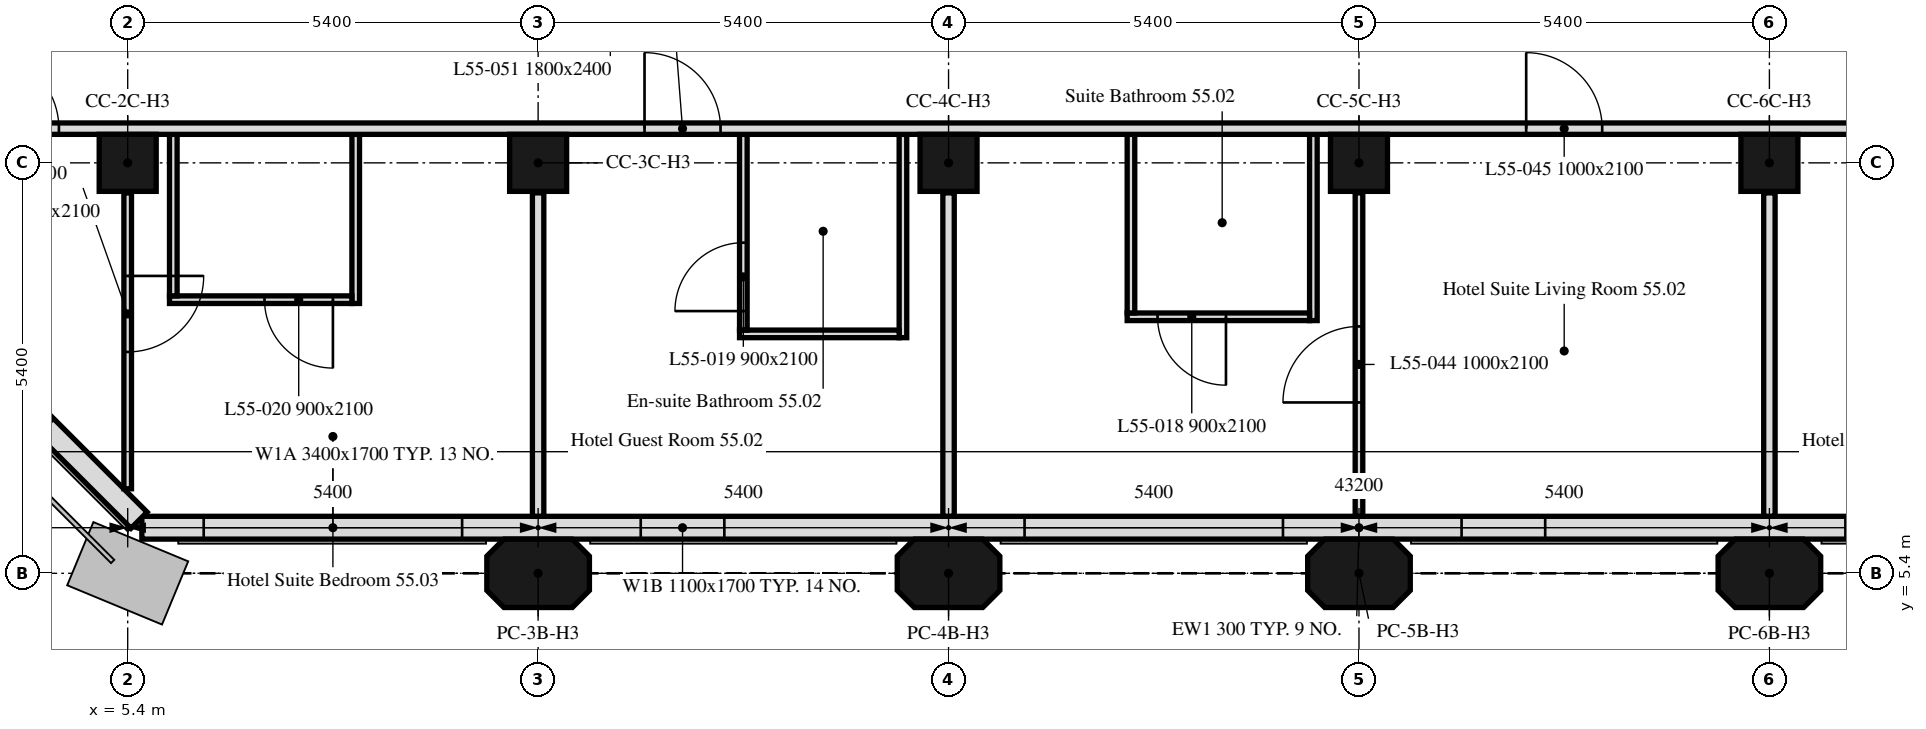
"""IFC4 building model, lengths in metres.
Left out: names, types, materials, properties, quantities, classifications, styles, units other than length and angle.
Written with IfcOpenShell. Run it as: python <this file> out.ifc"""

import sys

from ifc_helpers import new_model, si_unit, direction, frame, frame_2d, origin, origin_2d, place, context, subcontext, project, spatial, polyline, rectangle, outline, extrude, element, fill, save


model = new_model("IFC4")
c1 = context("Model", 3, precision=1e-05, world=origin(), true_north=direction((0.0, 1.0)))
c2 = subcontext(c1, "Body", "Model", "MODEL_VIEW")
j1 = project(units=[si_unit("LENGTHUNIT", "METRE"), si_unit("PLANEANGLEUNIT", "RADIAN")], contexts=[c1])
p1 = place(None, origin())
s1 = spatial("IfcSite", under=j1, at=p1, CompositionType="ELEMENT")
p2 = place(p1, origin())
s2 = spatial("IfcBuilding", under=s1, at=p2, CompositionType="ELEMENT")
p3 = place(p2, frame((0.0, 0.0, 220.3)))
s3 = spatial("IfcBuildingStorey", under=s2, at=p3, CompositionType="ELEMENT", Elevation=220.3)
for number, where, z_axis, x_axis in (
    (1, (10.8, 5.4, 0.0), (0.0, 0.0, 1.0), (1.0, 0.0, 0.0)),
    (2, (16.2, 5.4, 0.0), (0.0, 0.0, 1.0), (1.0, 0.0, 0.0)),
    (3, (21.6, 5.4, 0.0), (0.0, 0.0, 1.0), (1.0, 0.0, 0.0)),
    (4, (27.0, 5.4, 0.0), (0.0, 0.0, 1.0), (1.0, 0.0, 0.0)),
):
    element("IfcColumn", number, at=place(p3, frame(where, z_axis=z_axis, x_axis=x_axis)), inside=s3, PredefinedType="COLUMN", context=c2, shape_type="SweptSolid", body=[
        extrude(outline(polyline([(-0.45, -0.45), (0.45, -0.45), (0.675, -0.225), (0.675, 0.225), (0.45, 0.45), (-0.45, 0.45), (-0.675, 0.225), (-0.675, -0.225), (-0.45, -0.45)])), origin(), (0.0, 0.0, 1.0), 3.0),
    ])
for number, where, z_axis, x_axis in (
    (5, (5.4, 10.8, 0.0), (0.0, 0.0, 1.0), (1.0, 0.0, 0.0)),
    (6, (10.8, 10.8, 0.0), (0.0, 0.0, 1.0), (1.0, 0.0, 0.0)),
    (7, (16.2, 10.8, 0.0), (0.0, 0.0, 1.0), (1.0, 0.0, 0.0)),
    (8, (21.6, 10.8, 0.0), (0.0, 0.0, 1.0), (1.0, 0.0, 0.0)),
    (9, (27.0, 10.8, 0.0), (0.0, 0.0, 1.0), (1.0, 0.0, 0.0)),
):
    element("IfcColumn", number, at=place(p3, frame(where, z_axis=z_axis, x_axis=x_axis)), inside=s3, PredefinedType="COLUMN", context=c2, shape_type="SweptSolid", body=[
        extrude(rectangle(XDim=0.75, YDim=0.75, at=origin_2d()), origin(), (0.0, 0.0, 1.0), 3.0),
    ])
p4 = place(p3, frame((5.586, 6.0, 0.0), z_axis=(0.0, 0.0, 1.0), x_axis=(1.0, 0.0, 0.0)))
e10 = element("IfcWall", 10, at=p4, inside=s3, PredefinedType="SOLIDWALL", context=c2, shape_type="SweptSolid", body=[
    extrude(rectangle(XDim=32.027, YDim=0.3, at=frame_2d((16.014, 0.0))), origin(), (0.0, 0.0, 1.0), 3.0),
])
p5 = place(p4, frame((0.814, 0.0, 0.9)))
e11 = element("IfcOpeningElement", 11, at=p5, cuts=e10, PredefinedType="OPENING", context=c2, shape_type="SweptSolid", body=[
    extrude(rectangle(XDim=3.4, YDim=1.7, at=frame_2d((1.7, 0.85))), frame((0.0, 0.16, 0.0), z_axis=(0.0, -1.0, 0.0), x_axis=(1.0, 0.0, 0.0)), (0.0, 0.0, 1.0), 0.32),
])
p6 = place(p4, frame((6.564, 0.0, 0.9)))
e12 = element("IfcOpeningElement", 12, at=p6, cuts=e10, PredefinedType="OPENING", context=c2, shape_type="SweptSolid", body=[
    extrude(rectangle(XDim=1.1, YDim=1.7, at=frame_2d((0.55, 0.85))), frame((0.0, 0.16, 0.0), z_axis=(0.0, -1.0, 0.0), x_axis=(1.0, 0.0, 0.0)), (0.0, 0.0, 1.0), 0.32),
])
p7 = place(p4, frame((11.614, 0.0, 0.9)))
e13 = element("IfcOpeningElement", 13, at=p7, cuts=e10, PredefinedType="OPENING", context=c2, shape_type="SweptSolid", body=[
    extrude(rectangle(XDim=3.4, YDim=1.7, at=frame_2d((1.7, 0.85))), frame((0.0, 0.16, 0.0), z_axis=(0.0, -1.0, 0.0), x_axis=(1.0, 0.0, 0.0)), (0.0, 0.0, 1.0), 0.32),
])
p8 = place(p4, frame((17.364, 0.0, 0.9)))
e14 = element("IfcOpeningElement", 14, at=p8, cuts=e10, PredefinedType="OPENING", context=c2, shape_type="SweptSolid", body=[
    extrude(rectangle(XDim=1.1, YDim=1.7, at=frame_2d((0.55, 0.85))), frame((0.0, 0.16, 0.0), z_axis=(0.0, -1.0, 0.0), x_axis=(1.0, 0.0, 0.0)), (0.0, 0.0, 1.0), 0.32),
])
p9 = place(p4, frame((22.414, 0.0, 0.9)))
e15 = element("IfcOpeningElement", 15, at=p9, cuts=e10, PredefinedType="OPENING", context=c2, shape_type="SweptSolid", body=[
    extrude(rectangle(XDim=3.4, YDim=1.7, at=frame_2d((1.7, 0.85))), frame((0.0, 0.16, 0.0), z_axis=(0.0, -1.0, 0.0), x_axis=(1.0, 0.0, 0.0)), (0.0, 0.0, 1.0), 0.32),
])
p10 = place(p4, frame((28.164, 0.0, 0.9)))
e16 = element("IfcOpeningElement", 16, at=p10, cuts=e10, PredefinedType="OPENING", context=c2, shape_type="SweptSolid", body=[
    extrude(rectangle(XDim=1.1, YDim=1.7, at=frame_2d((0.55, 0.85))), frame((0.0, 0.16, 0.0), z_axis=(0.0, -1.0, 0.0), x_axis=(1.0, 0.0, 0.0)), (0.0, 0.0, 1.0), 0.32),
])
p11 = place(p3, frame((0.699, 10.949, 0.0), z_axis=(0.0, 0.0, 1.0), x_axis=(0.707106781187, -0.707106781187, 0.0)))
e17 = element("IfcWall", 17, at=p11, inside=s3, PredefinedType="SOLIDWALL", context=c2, shape_type="SweptSolid", body=[
    extrude(rectangle(XDim=6.86, YDim=0.3, at=frame_2d((3.43, 0.0))), origin(), (0.0, 0.0, 1.0), 3.0),
])
p12 = place(p11, frame((1.73, 0.0, 0.9)))
e18 = element("IfcOpeningElement", 18, at=p12, cuts=e17, PredefinedType="OPENING", context=c2, shape_type="SweptSolid", body=[
    extrude(rectangle(XDim=3.4, YDim=1.7, at=frame_2d((1.7, 0.85))), frame((0.0, 0.16, 0.0), z_axis=(0.0, -1.0, 0.0), x_axis=(1.0, 0.0, 0.0)), (0.0, 0.0, 1.0), 0.32),
])
p13 = place(p3, frame((27.0, 10.405, 0.0), z_axis=(0.0, 0.0, 1.0), x_axis=(0.0, -1.0, 0.0)))
e19 = element("IfcWall", 19, at=p13, inside=s3, PredefinedType="PARTITIONING", context=c2, shape_type="SweptSolid", body=[
    extrude(rectangle(XDim=4.254, YDim=0.15, at=frame_2d((2.127, 0.0))), origin(), (0.0, 0.0, 1.0), 3.0),
])
p14 = place(p3, frame((21.6, 6.151, 0.0), z_axis=(0.0, 0.0, 1.0), x_axis=(0.0, 1.0, 0.0)))
e20 = element("IfcWall", 20, at=p14, inside=s3, PredefinedType="PARTITIONING", context=c2, shape_type="SweptSolid", body=[
    extrude(rectangle(XDim=4.254, YDim=0.1, at=frame_2d((2.127, 0.0))), origin(), (0.0, 0.0, 1.0), 3.0),
])
p15 = place(p14, frame((1.497, 0.0, 0.0)))
e21 = element("IfcOpeningElement", 21, at=p15, cuts=e20, PredefinedType="OPENING", context=c2, shape_type="SweptSolid", body=[
    extrude(rectangle(XDim=1.0, YDim=2.1, at=frame_2d((0.5, 1.05))), frame((0.0, 0.05, 0.0), z_axis=(0.0, -1.0, 0.0), x_axis=(1.0, 0.0, 0.0)), (0.0, 0.0, 1.0), 0.1),
])
p16 = place(p3, frame((21.0, 11.175, 0.0), z_axis=(0.0, 0.0, 1.0), x_axis=(0.0, -1.0, 0.0)))
e22 = element("IfcWall", 22, at=p16, inside=s3, PredefinedType="PARTITIONING", context=c2, shape_type="SweptSolid", body=[
    extrude(rectangle(XDim=2.45, YDim=0.1, at=frame_2d((1.225, 0.0))), origin(), (0.0, 0.0, 1.0), 3.0),
])
p17 = place(p3, frame((20.95, 8.775, 0.0), z_axis=(0.0, 0.0, 1.0), x_axis=(-1.0, 0.0, 0.0)))
e23 = element("IfcWall", 23, at=p17, inside=s3, PredefinedType="PARTITIONING", context=c2, shape_type="SweptSolid", body=[
    extrude(rectangle(XDim=2.4, YDim=0.1, at=frame_2d((1.2, 0.0))), origin(), (0.0, 0.0, 1.0), 3.0),
])
p18 = place(p17, frame((1.1, 0.0, 0.0)))
e24 = element("IfcOpeningElement", 24, at=p18, cuts=e23, PredefinedType="OPENING", context=c2, shape_type="SweptSolid", body=[
    extrude(rectangle(XDim=0.9, YDim=2.1, at=frame_2d((0.45, 1.05))), frame((0.0, 0.05, 0.0), z_axis=(0.0, -1.0, 0.0), x_axis=(1.0, 0.0, 0.0)), (0.0, 0.0, 1.0), 0.1),
])
p19 = place(p3, frame((18.6, 8.825, 0.0), z_axis=(0.0, 0.0, 1.0), x_axis=(0.0, 1.0, 0.0)))
e25 = element("IfcWall", 25, at=p19, inside=s3, PredefinedType="PARTITIONING", context=c2, shape_type="SweptSolid", body=[
    extrude(rectangle(XDim=2.35, YDim=0.1, at=frame_2d((1.175, 0.0))), origin(), (0.0, 0.0, 1.0), 3.0),
])
p20 = place(p3, frame((16.2, 10.405, 0.0), z_axis=(0.0, 0.0, 1.0), x_axis=(0.0, -1.0, 0.0)))
e26 = element("IfcWall", 26, at=p20, inside=s3, PredefinedType="PARTITIONING", context=c2, shape_type="SweptSolid", body=[
    extrude(rectangle(XDim=4.254, YDim=0.15, at=frame_2d((2.127, 0.0))), origin(), (0.0, 0.0, 1.0), 3.0),
])
p21 = place(p3, frame((15.6, 11.175, 0.0), z_axis=(0.0, 0.0, 1.0), x_axis=(0.0, -1.0, 0.0)))
e27 = element("IfcWall", 27, at=p21, inside=s3, PredefinedType="PARTITIONING", context=c2, shape_type="SweptSolid", body=[
    extrude(rectangle(XDim=2.675, YDim=0.1, at=frame_2d((1.337, 0.0))), origin(), (0.0, 0.0, 1.0), 3.0),
])
p22 = place(p3, frame((15.55, 8.55, 0.0), z_axis=(0.0, 0.0, 1.0), x_axis=(-1.0, 0.0, 0.0)))
e28 = element("IfcWall", 28, at=p22, inside=s3, PredefinedType="PARTITIONING", context=c2, shape_type="SweptSolid", body=[
    extrude(rectangle(XDim=2.1, YDim=0.1, at=frame_2d((1.05, 0.0))), origin(), (0.0, 0.0, 1.0), 3.0),
])
p23 = place(p3, frame((13.5, 8.6, 0.0), z_axis=(0.0, 0.0, 1.0), x_axis=(0.0, 1.0, 0.0)))
e29 = element("IfcWall", 29, at=p23, inside=s3, PredefinedType="PARTITIONING", context=c2, shape_type="SweptSolid", body=[
    extrude(rectangle(XDim=2.575, YDim=0.1, at=frame_2d((1.288, 0.0))), origin(), (0.0, 0.0, 1.0), 3.0),
])
p24 = place(p23, frame((0.25, 0.0, 0.0)))
e30 = element("IfcOpeningElement", 30, at=p24, cuts=e29, PredefinedType="OPENING", context=c2, shape_type="SweptSolid", body=[
    extrude(rectangle(XDim=0.9, YDim=2.1, at=frame_2d((0.45, 1.05))), frame((0.0, 0.05, 0.0), z_axis=(0.0, -1.0, 0.0), x_axis=(1.0, 0.0, 0.0)), (0.0, 0.0, 1.0), 0.1),
])
p25 = place(p3, frame((10.8, 10.405, 0.0), z_axis=(0.0, 0.0, 1.0), x_axis=(0.0, -1.0, 0.0)))
e31 = element("IfcWall", 31, at=p25, inside=s3, PredefinedType="PARTITIONING", context=c2, shape_type="SweptSolid", body=[
    extrude(rectangle(XDim=4.254, YDim=0.15, at=frame_2d((2.127, 0.0))), origin(), (0.0, 0.0, 1.0), 3.0),
])
p26 = place(p3, frame((8.4, 11.175, 0.0), z_axis=(0.0, 0.0, 1.0), x_axis=(0.0, -1.0, 0.0)))
e32 = element("IfcWall", 32, at=p26, inside=s3, PredefinedType="PARTITIONING", context=c2, shape_type="SweptSolid", body=[
    extrude(rectangle(XDim=2.225, YDim=0.1, at=frame_2d((1.113, 0.0))), origin(), (0.0, 0.0, 1.0), 3.0),
])
p27 = place(p3, frame((8.35, 9.0, 0.0), z_axis=(0.0, 0.0, 1.0), x_axis=(-1.0, 0.0, 0.0)))
e33 = element("IfcWall", 33, at=p27, inside=s3, PredefinedType="PARTITIONING", context=c2, shape_type="SweptSolid", body=[
    extrude(rectangle(XDim=2.4, YDim=0.1, at=frame_2d((1.2, 0.0))), origin(), (0.0, 0.0, 1.0), 3.0),
])
p28 = place(p27, frame((0.25, 0.0, 0.0)))
e34 = element("IfcOpeningElement", 34, at=p28, cuts=e33, PredefinedType="OPENING", context=c2, shape_type="SweptSolid", body=[
    extrude(rectangle(XDim=0.9, YDim=2.1, at=frame_2d((0.45, 1.05))), frame((0.0, 0.05, 0.0), z_axis=(0.0, -1.0, 0.0), x_axis=(1.0, 0.0, 0.0)), (0.0, 0.0, 1.0), 0.1),
])
p29 = place(p3, frame((6.0, 9.05, 0.0), z_axis=(0.0, 0.0, 1.0), x_axis=(0.0, 1.0, 0.0)))
e35 = element("IfcWall", 35, at=p29, inside=s3, PredefinedType="PARTITIONING", context=c2, shape_type="SweptSolid", body=[
    extrude(rectangle(XDim=2.125, YDim=0.1, at=frame_2d((1.062, 0.0))), origin(), (0.0, 0.0, 1.0), 3.0),
])
p30 = place(p3, frame((5.4, 10.405, 0.0), z_axis=(0.0, 0.0, 1.0), x_axis=(0.0, -1.0, 0.0)))
e36 = element("IfcWall", 36, at=p30, inside=s3, PredefinedType="PARTITIONING", context=c2, shape_type="SweptSolid", body=[
    extrude(rectangle(XDim=3.893, YDim=0.1, at=frame_2d((1.946, 0.0))), origin(), (0.0, 0.0, 1.0), 3.0),
])
p31 = place(p30, frame((1.093, 0.0, 0.0)))
e37 = element("IfcOpeningElement", 37, at=p31, cuts=e36, PredefinedType="OPENING", context=c2, shape_type="SweptSolid", body=[
    extrude(rectangle(XDim=1.0, YDim=2.1, at=frame_2d((0.5, 1.05))), frame((0.0, 0.05, 0.0), z_axis=(0.0, -1.0, 0.0), x_axis=(1.0, 0.0, 0.0)), (0.0, 0.0, 1.0), 0.1),
])
p32 = place(p3, frame((0.751, 11.25, 0.0), z_axis=(0.0, 0.0, 1.0), x_axis=(1.0, 0.0, 0.0)))
e38 = element("IfcWall", 38, at=p32, inside=s3, PredefinedType="PARTITIONING", context=c2, shape_type="SweptSolid", body=[
    extrude(rectangle(XDim=41.698, YDim=0.15, at=frame_2d((20.849, 0.0))), origin(), (0.0, 0.0, 1.0), 3.0),
])
p33 = place(p32, frame((39.249, 0.0, 0.0)))
e39 = element("IfcOpeningElement", 39, at=p33, cuts=e38, PredefinedType="OPENING", context=c2, shape_type="SweptSolid", body=[
    extrude(rectangle(XDim=1.0, YDim=2.1, at=frame_2d((0.5, 1.05))), frame((0.0, 0.075, 0.0), z_axis=(0.0, -1.0, 0.0), x_axis=(1.0, 0.0, 0.0)), (0.0, 0.0, 1.0), 0.15),
])
p34 = place(p32, frame((27.649, 0.0, 0.0)))
e40 = element("IfcOpeningElement", 40, at=p34, cuts=e38, PredefinedType="OPENING", context=c2, shape_type="SweptSolid", body=[
    extrude(rectangle(XDim=1.0, YDim=2.1, at=frame_2d((0.5, 1.05))), frame((0.0, 0.075, 0.0), z_axis=(0.0, -1.0, 0.0), x_axis=(1.0, 0.0, 0.0)), (0.0, 0.0, 1.0), 0.15),
])
p35 = place(p32, frame((23.049, 0.0, 0.0)))
e41 = element("IfcOpeningElement", 41, at=p35, cuts=e38, PredefinedType="OPENING", context=c2, shape_type="SweptSolid", body=[
    extrude(rectangle(XDim=1.0, YDim=2.1, at=frame_2d((0.5, 1.05))), frame((0.0, 0.075, 0.0), z_axis=(0.0, -1.0, 0.0), x_axis=(1.0, 0.0, 0.0)), (0.0, 0.0, 1.0), 0.15),
])
p36 = place(p32, frame((11.449, 0.0, 0.0)))
e42 = element("IfcOpeningElement", 42, at=p36, cuts=e38, PredefinedType="OPENING", context=c2, shape_type="SweptSolid", body=[
    extrude(rectangle(XDim=1.0, YDim=2.1, at=frame_2d((0.5, 1.05))), frame((0.0, 0.075, 0.0), z_axis=(0.0, -1.0, 0.0), x_axis=(1.0, 0.0, 0.0)), (0.0, 0.0, 1.0), 0.15),
])
p37 = place(p32, frame((2.744, 0.0, 0.0)))
e43 = element("IfcOpeningElement", 43, at=p37, cuts=e38, PredefinedType="OPENING", context=c2, shape_type="SweptSolid", body=[
    extrude(rectangle(XDim=1.0, YDim=2.1, at=frame_2d((0.5, 1.05))), frame((0.0, 0.075, 0.0), z_axis=(0.0, -1.0, 0.0), x_axis=(1.0, 0.0, 0.0)), (0.0, 0.0, 1.0), 0.15),
])
p38 = place(p5, origin())
e44 = element("IfcWindow", 44, at=p38, inside=s3, PartitioningType="SINGLE_PANEL", PredefinedType="WINDOW", context=c2, shape_type="SweptSolid", body=[
    extrude(rectangle(XDim=3.4, YDim=1.7, at=frame_2d((1.7, 0.85))), frame((0.0, 0.03, 0.0), z_axis=(0.0, -1.0, 0.0), x_axis=(1.0, 0.0, 0.0)), (0.0, 0.0, 1.0), 0.06),
])
fill(e11, e44)
p39 = place(p6, origin())
e45 = element("IfcWindow", 45, at=p39, inside=s3, PartitioningType="SINGLE_PANEL", PredefinedType="WINDOW", context=c2, shape_type="SweptSolid", body=[
    extrude(rectangle(XDim=1.1, YDim=1.7, at=frame_2d((0.55, 0.85))), frame((0.0, 0.03, 0.0), z_axis=(0.0, -1.0, 0.0), x_axis=(1.0, 0.0, 0.0)), (0.0, 0.0, 1.0), 0.06),
])
fill(e12, e45)
p40 = place(p7, origin())
e46 = element("IfcWindow", 46, at=p40, inside=s3, PartitioningType="SINGLE_PANEL", PredefinedType="WINDOW", context=c2, shape_type="SweptSolid", body=[
    extrude(rectangle(XDim=3.4, YDim=1.7, at=frame_2d((1.7, 0.85))), frame((0.0, 0.03, 0.0), z_axis=(0.0, -1.0, 0.0), x_axis=(1.0, 0.0, 0.0)), (0.0, 0.0, 1.0), 0.06),
])
fill(e13, e46)
p41 = place(p8, origin())
e47 = element("IfcWindow", 47, at=p41, inside=s3, PartitioningType="SINGLE_PANEL", PredefinedType="WINDOW", context=c2, shape_type="SweptSolid", body=[
    extrude(rectangle(XDim=1.1, YDim=1.7, at=frame_2d((0.55, 0.85))), frame((0.0, 0.03, 0.0), z_axis=(0.0, -1.0, 0.0), x_axis=(1.0, 0.0, 0.0)), (0.0, 0.0, 1.0), 0.06),
])
fill(e14, e47)
p42 = place(p18, origin())
e48 = element("IfcDoor", 48, at=p42, inside=s3, OperationType="SINGLE_SWING_RIGHT", PredefinedType="DOOR", context=c2, shape_type="SweptSolid", body=[
    extrude(rectangle(XDim=0.9, YDim=2.1, at=frame_2d((0.45, 1.05))), frame((0.0, 0.025, 0.0), z_axis=(0.0, -1.0, 0.0), x_axis=(1.0, 0.0, 0.0)), (0.0, 0.0, 1.0), 0.05),
])
fill(e24, e48)
p43 = place(p24, origin())
e49 = element("IfcDoor", 49, at=p43, inside=s3, OperationType="SINGLE_SWING_RIGHT", PredefinedType="DOOR", context=c2, shape_type="SweptSolid", body=[
    extrude(rectangle(XDim=0.9, YDim=2.1, at=frame_2d((0.45, 1.05))), frame((0.0, 0.025, 0.0), z_axis=(0.0, -1.0, 0.0), x_axis=(1.0, 0.0, 0.0)), (0.0, 0.0, 1.0), 0.05),
])
fill(e30, e49)
p44 = place(p28, origin())
e50 = element("IfcDoor", 50, at=p44, inside=s3, OperationType="SINGLE_SWING_LEFT", PredefinedType="DOOR", context=c2, shape_type="SweptSolid", body=[
    extrude(rectangle(XDim=0.9, YDim=2.1, at=frame_2d((0.45, 1.05))), frame((0.0, 0.025, 0.0), z_axis=(0.0, -1.0, 0.0), x_axis=(1.0, 0.0, 0.0)), (0.0, 0.0, 1.0), 0.05),
])
fill(e34, e50)
p45 = place(p15, origin())
e51 = element("IfcDoor", 51, at=p45, inside=s3, OperationType="SINGLE_SWING_RIGHT", PredefinedType="DOOR", context=c2, shape_type="SweptSolid", body=[
    extrude(rectangle(XDim=1.0, YDim=2.1, at=frame_2d((0.5, 1.05))), frame((0.0, 0.025, 0.0), z_axis=(0.0, -1.0, 0.0), x_axis=(1.0, 0.0, 0.0)), (0.0, 0.0, 1.0), 0.05),
])
fill(e21, e51)
p46 = place(p35, origin())
e52 = element("IfcDoor", 52, at=p46, inside=s3, OperationType="SINGLE_SWING_LEFT", PredefinedType="DOOR", context=c2, shape_type="SweptSolid", body=[
    extrude(rectangle(XDim=1.0, YDim=2.1, at=frame_2d((0.5, 1.05))), frame((0.0, 0.025, 0.0), z_axis=(0.0, -1.0, 0.0), x_axis=(1.0, 0.0, 0.0)), (0.0, 0.0, 1.0), 0.05),
])
fill(e41, e52)
p47 = place(p36, origin())
e53 = element("IfcDoor", 53, at=p47, inside=s3, OperationType="SINGLE_SWING_LEFT", PredefinedType="DOOR", context=c2, shape_type="SweptSolid", body=[
    extrude(rectangle(XDim=1.0, YDim=2.1, at=frame_2d((0.5, 1.05))), frame((0.0, 0.025, 0.0), z_axis=(0.0, -1.0, 0.0), x_axis=(1.0, 0.0, 0.0)), (0.0, 0.0, 1.0), 0.05),
])
fill(e42, e53)
p48 = place(p31, origin())
e54 = element("IfcDoor", 54, at=p48, inside=s3, OperationType="SINGLE_SWING_LEFT", PredefinedType="DOOR", context=c2, shape_type="SweptSolid", body=[
    extrude(rectangle(XDim=1.0, YDim=2.1, at=frame_2d((0.5, 1.05))), frame((0.0, 0.025, 0.0), z_axis=(0.0, -1.0, 0.0), x_axis=(1.0, 0.0, 0.0)), (0.0, 0.0, 1.0), 0.05),
])
fill(e37, e54)
p49 = place(p37, origin())
e55 = element("IfcDoor", 55, at=p49, inside=s3, OperationType="SINGLE_SWING_RIGHT", PredefinedType="DOOR", context=c2, shape_type="SweptSolid", body=[
    extrude(rectangle(XDim=1.0, YDim=2.1, at=frame_2d((0.5, 1.05))), frame((0.0, 0.025, 0.0), z_axis=(0.0, -1.0, 0.0), x_axis=(1.0, 0.0, 0.0)), (0.0, 0.0, 1.0), 0.05),
])
fill(e43, e55)
save(model, sys.argv[1])
